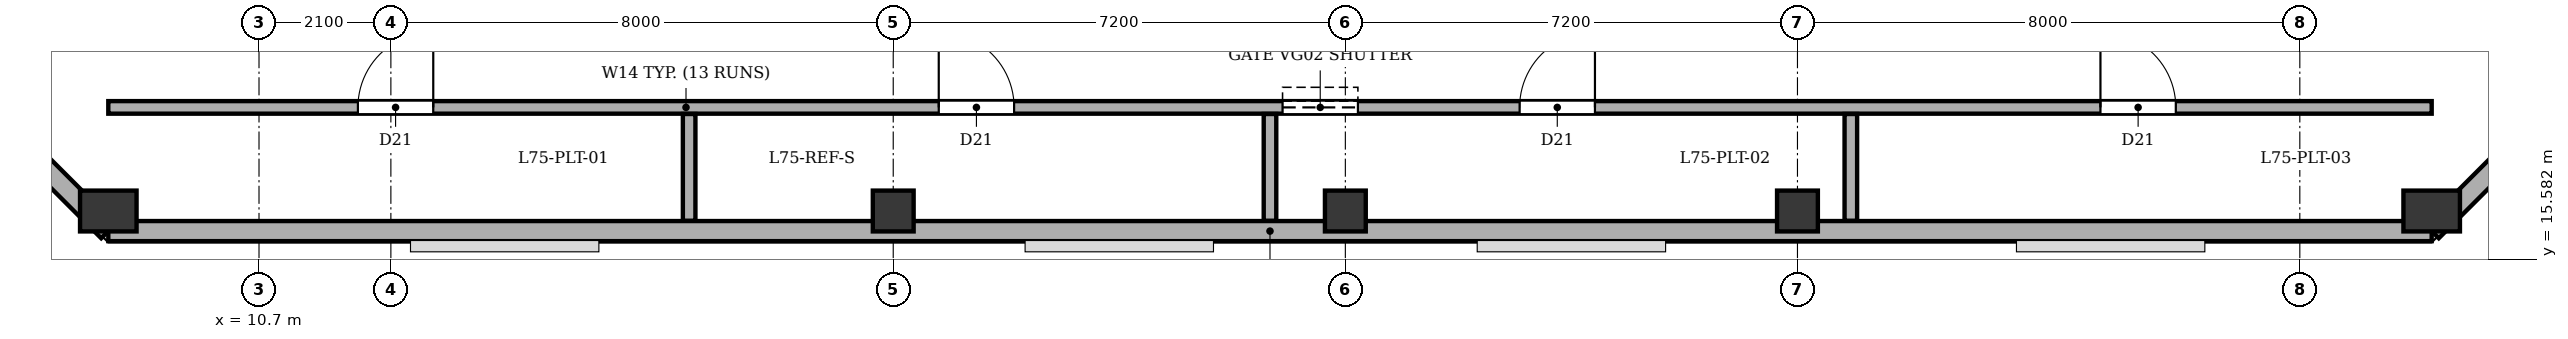
"""IFC4 building model, lengths in metres.
Left out: names, types, materials, properties, quantities, classifications, styles, units other than length and angle.
Written with IfcOpenShell. Run it as: python <this file> out.ifc"""

import sys

from ifc_helpers import new_model, si_unit, direction, frame, frame_2d, origin, origin_2d, place, context, subcontext, project, spatial, rectangle, extrude, element, fill, save


model = new_model("IFC4")
c1 = context("Model", 3, precision=1e-05, world=origin(), true_north=direction((0.0, 1.0)))
c2 = subcontext(c1, "Body", "Model", "MODEL_VIEW")
j1 = project(units=[si_unit("LENGTHUNIT", "METRE"), si_unit("PLANEANGLEUNIT", "RADIAN")], contexts=[c1])
p1 = place(None, origin())
s1 = spatial("IfcSite", under=j1, at=p1, CompositionType="ELEMENT")
p2 = place(p1, origin())
s2 = spatial("IfcBuilding", under=s1, at=p2, CompositionType="ELEMENT")
p3 = place(p2, frame((0.0, 0.0, 282.3)))
s3 = spatial("IfcBuildingStorey", under=s2, at=p3, CompositionType="ELEMENT", Elevation=282.3)
p4 = place(p3, frame((8.3, 16.35, 0.0), z_axis=(0.0, 0.0, 1.0), x_axis=(1.0, 0.0, 0.0)))
e1 = element("IfcColumn", 1, at=p4, inside=s3, PredefinedType="COLUMN", context=c2, shape_type="SweptSolid", body=[
    extrude(rectangle(XDim=0.65, YDim=0.9, at=origin_2d()), origin(), (0.0, 0.0, 1.0), 5.1),
])
for number, where, z_axis, x_axis in (
    (2, (20.8, 16.35, 0.0), (0.0, 0.0, 1.0), (1.0, 0.0, 0.0)),
    (3, (28.0, 16.35, 0.0), (0.0, 0.0, 1.0), (1.0, 0.0, 0.0)),
    (4, (35.2, 16.35, 0.0), (0.0, 0.0, 1.0), (1.0, 0.0, 0.0)),
):
    element("IfcColumn", number, at=place(p3, frame(where, z_axis=z_axis, x_axis=x_axis)), inside=s3, PredefinedType="COLUMN", context=c2, shape_type="SweptSolid", body=[
        extrude(rectangle(XDim=0.65, YDim=0.65, at=origin_2d()), origin(), (0.0, 0.0, 1.0), 5.1),
    ])
p5 = place(p3, frame((45.3, 16.35, 0.0), z_axis=(0.0, 0.0, 1.0), x_axis=(1.0, 0.0, 0.0)))
e5 = element("IfcColumn", 5, at=p5, inside=s3, PredefinedType="COLUMN", context=c2, shape_type="SweptSolid", body=[
    extrude(rectangle(XDim=0.65, YDim=0.9, at=origin_2d()), origin(), (0.0, 0.0, 1.0), 5.1),
])
p6 = place(p3, frame((45.3, 16.03, 0.0), z_axis=(0.0, 0.0, 1.0), x_axis=(-1.0, 0.0, 0.0)))
e6 = element("IfcWall", 6, at=p6, inside=s3, PredefinedType="STANDARD", context=c2, shape_type="SweptSolid", body=[
    extrude(rectangle(XDim=37.0, YDim=0.32, at=frame_2d((18.5, 0.0))), origin(), (0.0, 0.0, 1.0), 4.035),
])
for number, where, z_axis, x_axis in (
    (7, (8.3, 16.03, 0.0), (0.0, 0.0, 1.0), (-0.707, 0.707, 0.0)),
    (8, (49.12, 19.85, 0.0), (0.0, 0.0, 1.0), (-0.707, -0.707, 0.0)),
):
    element("IfcWall", number, at=place(p3, frame(where, z_axis=z_axis, x_axis=x_axis)), inside=s3, PredefinedType="STANDARD", context=c2, shape_type="SweptSolid", body=[
        extrude(rectangle(XDim=5.402, YDim=0.32, at=frame_2d((2.701, 0.0))), origin(), (0.0, 0.0, 1.0), 4.035),
    ])
p7 = place(p3, frame((8.3, 18.0, 0.0), z_axis=(0.0, 0.0, 1.0), x_axis=(1.0, 0.0, 0.0)))
e9 = element("IfcWall", 9, at=p7, inside=s3, PredefinedType="SOLIDWALL", context=c2, shape_type="SweptSolid", body=[
    extrude(rectangle(XDim=37.0, YDim=0.2, at=frame_2d((18.5, 0.0))), origin(), (0.0, 0.0, 1.0), 4.65),
])
p8 = place(p7, frame((3.975, 0.0, 0.0)))
e10 = element("IfcOpeningElement", 10, at=p8, cuts=e9, PredefinedType="OPENING", context=c2, shape_type="SweptSolid", body=[
    extrude(rectangle(XDim=1.2, YDim=2.15, at=frame_2d((0.6, 1.075))), frame((0.0, 0.11, 0.0), z_axis=(0.0, -1.0, 0.0), x_axis=(1.0, 0.0, 0.0)), (0.0, 0.0, 1.0), 0.22),
])
p9 = place(p7, frame((13.225, 0.0, 0.0)))
e11 = element("IfcOpeningElement", 11, at=p9, cuts=e9, PredefinedType="OPENING", context=c2, shape_type="SweptSolid", body=[
    extrude(rectangle(XDim=1.2, YDim=2.15, at=frame_2d((0.6, 1.075))), frame((0.0, 0.11, 0.0), z_axis=(0.0, -1.0, 0.0), x_axis=(1.0, 0.0, 0.0)), (0.0, 0.0, 1.0), 0.22),
])
p10 = place(p7, frame((22.475, 0.0, 0.0)))
e12 = element("IfcOpeningElement", 12, at=p10, cuts=e9, PredefinedType="OPENING", context=c2, shape_type="SweptSolid", body=[
    extrude(rectangle(XDim=1.2, YDim=2.15, at=frame_2d((0.6, 1.075))), frame((0.0, 0.11, 0.0), z_axis=(0.0, -1.0, 0.0), x_axis=(1.0, 0.0, 0.0)), (0.0, 0.0, 1.0), 0.22),
])
p11 = place(p7, frame((31.725, 0.0, 0.0)))
e13 = element("IfcOpeningElement", 13, at=p11, cuts=e9, PredefinedType="OPENING", context=c2, shape_type="SweptSolid", body=[
    extrude(rectangle(XDim=1.2, YDim=2.15, at=frame_2d((0.6, 1.075))), frame((0.0, 0.11, 0.0), z_axis=(0.0, -1.0, 0.0), x_axis=(1.0, 0.0, 0.0)), (0.0, 0.0, 1.0), 0.22),
])
p12 = place(p7, frame((18.7, 0.0, 0.0)))
e14 = element("IfcOpeningElement", 14, at=p12, cuts=e9, PredefinedType="OPENING", context=c2, shape_type="SweptSolid", body=[
    extrude(rectangle(XDim=1.2, YDim=2.15, at=frame_2d((0.6, 1.075))), frame((0.0, 0.11, 0.0), z_axis=(0.0, -1.0, 0.0), x_axis=(1.0, 0.0, 0.0)), (0.0, 0.0, 1.0), 0.22),
])
for number, where, z_axis, x_axis in (
    (15, (17.55, 16.195, 0.0), (0.0, 0.0, 1.0), (0.0, 1.0, 0.0)),
    (16, (26.8, 16.195, 0.0), (0.0, 0.0, 1.0), (0.0, 1.0, 0.0)),
    (17, (36.05, 16.195, 0.0), (0.0, 0.0, 1.0), (0.0, 1.0, 0.0)),
):
    element("IfcWall", number, at=place(p3, frame(where, z_axis=z_axis, x_axis=x_axis)), inside=s3, PredefinedType="SOLIDWALL", context=c2, shape_type="SweptSolid", body=[
        extrude(rectangle(XDim=1.7, YDim=0.2, at=frame_2d((0.85, 0.0))), origin(), (0.0, 0.0, 1.0), 4.65),
    ])
p13 = place(p8, origin())
e18 = element("IfcDoor", 18, at=p13, inside=s3, OperationType="SINGLE_SWING_RIGHT", PredefinedType="DOOR", context=c2, shape_type="SweptSolid", body=[
    extrude(rectangle(XDim=1.2, YDim=2.15, at=frame_2d((0.6, 1.075))), frame((0.0, 0.025, 0.0), z_axis=(0.0, -1.0, 0.0), x_axis=(1.0, 0.0, 0.0)), (0.0, 0.0, 1.0), 0.05),
])
fill(e10, e18)
p14 = place(p9, origin())
e19 = element("IfcDoor", 19, at=p14, inside=s3, OperationType="SINGLE_SWING_LEFT", PredefinedType="DOOR", context=c2, shape_type="SweptSolid", body=[
    extrude(rectangle(XDim=1.2, YDim=2.15, at=frame_2d((0.6, 1.075))), frame((0.0, 0.025, 0.0), z_axis=(0.0, -1.0, 0.0), x_axis=(1.0, 0.0, 0.0)), (0.0, 0.0, 1.0), 0.05),
])
fill(e11, e19)
p15 = place(p10, origin())
e20 = element("IfcDoor", 20, at=p15, inside=s3, OperationType="SINGLE_SWING_RIGHT", PredefinedType="DOOR", context=c2, shape_type="SweptSolid", body=[
    extrude(rectangle(XDim=1.2, YDim=2.15, at=frame_2d((0.6, 1.075))), frame((0.0, 0.025, 0.0), z_axis=(0.0, -1.0, 0.0), x_axis=(1.0, 0.0, 0.0)), (0.0, 0.0, 1.0), 0.05),
])
fill(e12, e20)
p16 = place(p11, origin())
e21 = element("IfcDoor", 21, at=p16, inside=s3, OperationType="SINGLE_SWING_LEFT", PredefinedType="DOOR", context=c2, shape_type="SweptSolid", body=[
    extrude(rectangle(XDim=1.2, YDim=2.15, at=frame_2d((0.6, 1.075))), frame((0.0, 0.025, 0.0), z_axis=(0.0, -1.0, 0.0), x_axis=(1.0, 0.0, 0.0)), (0.0, 0.0, 1.0), 0.05),
])
fill(e13, e21)
p17 = place(p12, origin())
e22 = element("IfcDoor", 22, at=p17, inside=s3, OperationType="SINGLE_SWING_LEFT", PredefinedType="GATE", context=c2, shape_type="SweptSolid", body=[
    extrude(rectangle(XDim=1.2, YDim=2.15, at=frame_2d((0.6, 1.075))), frame((0.0, 0.025, 0.0), z_axis=(0.0, -1.0, 0.0), x_axis=(1.0, 0.0, 0.0)), (0.0, 0.0, 1.0), 0.05),
])
fill(e14, e22)
save(model, sys.argv[1])
